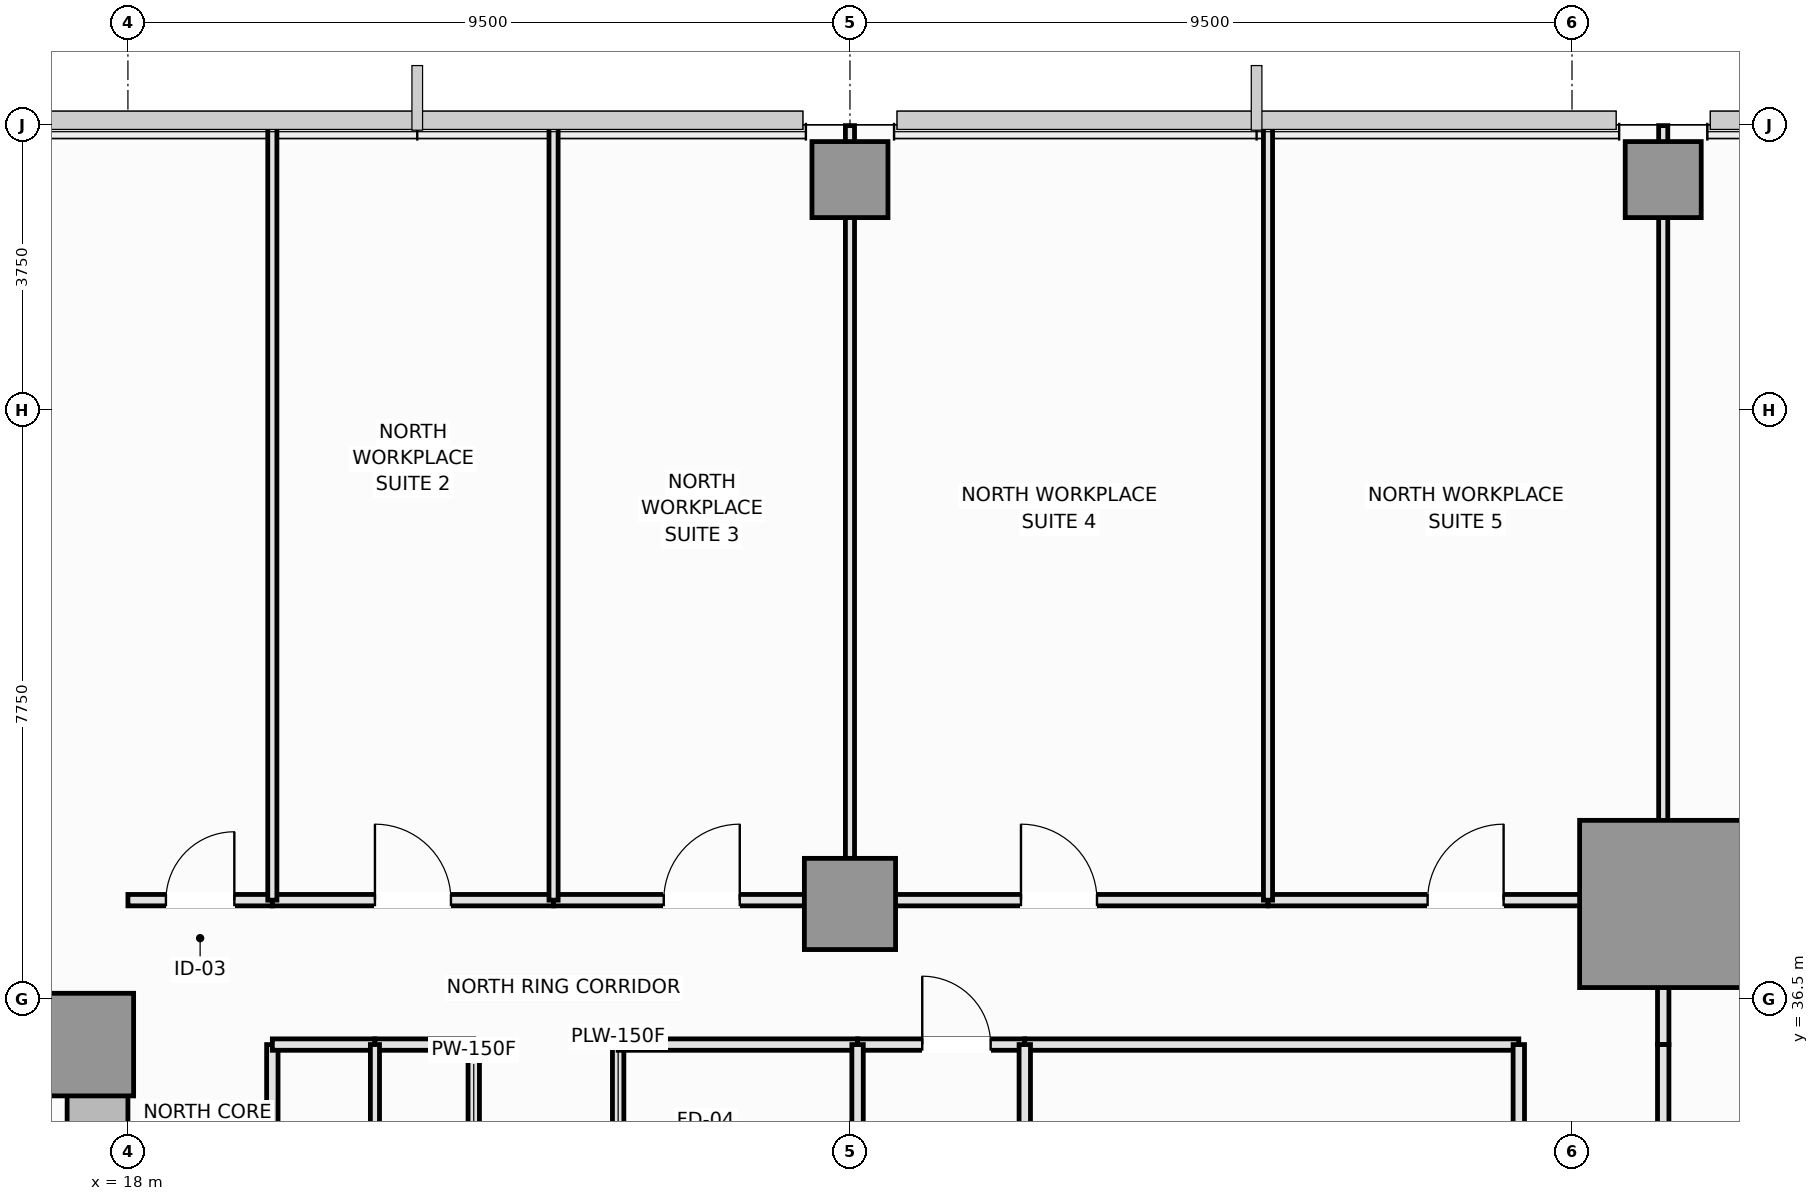
"""IFC4 building model, lengths in metres.
Left out: names, types, materials, properties, quantities, classifications, styles, units other than length and angle.
Written with IfcOpenShell. Run it as: python <this file> out.ifc"""

import sys

from ifc_helpers import new_model, si_unit, direction, frame, frame_2d, origin, origin_2d, place, context, subcontext, project, spatial, rectangle, extrude, element, fill, save


model = new_model("IFC4")
c1 = context("Model", 3, precision=1e-05, world=origin(), true_north=direction((0.0, 1.0)))
c2 = subcontext(c1, "Body", "Model", "MODEL_VIEW")
j1 = project(units=[si_unit("LENGTHUNIT", "METRE"), si_unit("PLANEANGLEUNIT", "RADIAN")], contexts=[c1])
p1 = place(None, origin())
s1 = spatial("IfcSite", under=j1, at=p1, CompositionType="ELEMENT")
p2 = place(p1, origin())
s2 = spatial("IfcBuilding", under=s1, at=p2, CompositionType="ELEMENT")
p3 = place(p2, frame((0.0, 0.0, 57.55)))
s3 = spatial("IfcBuildingStorey", under=s2, at=p3, CompositionType="ELEMENT", Elevation=57.55)
p4 = place(p3, frame((4.5, 36.1, 0.0), z_axis=(0.0, 0.0, 1.0), x_axis=(1.0, 0.0, 0.0)))
e1 = element("IfcWall", 1, at=p4, inside=s3, PredefinedType="SHEAR", context=c2, shape_type="SweptSolid", body=[
    extrude(rectangle(XDim=13.5, YDim=0.8, at=frame_2d((6.75, 0.0))), origin(), (0.0, 0.0, 1.0), 3.55),
])
p5 = place(p3, frame((17.6, 27.05, 0.0), z_axis=(0.0, 0.0, 1.0), x_axis=(0.0, 1.0, 0.0)))
e2 = element("IfcWall", 2, at=p5, inside=s3, PredefinedType="SHEAR", context=c2, shape_type="SweptSolid", body=[
    extrude(rectangle(XDim=8.65, YDim=0.8, at=frame_2d((4.325, 0.0))), origin(), (0.0, 0.0, 1.0), 3.55),
])
p6 = place(p5, frame((3.45, 0.0, 0.0)))
e3 = element("IfcOpeningElement", 3, at=p6, cuts=e2, PredefinedType="OPENING", context=c2, shape_type="SweptSolid", body=[
    extrude(rectangle(XDim=1.1, YDim=2.15, at=frame_2d((0.55, 1.075))), frame((0.0, 0.41, 0.0), z_axis=(0.0, -1.0, 0.0), x_axis=(1.0, 0.0, 0.0)), (0.0, 0.0, 1.0), 0.82),
])
p7 = place(p3, frame((17.4, 35.9, 0.0), z_axis=(0.0, 0.0, 1.0), x_axis=(1.0, 0.0, 0.0)))
e4 = element("IfcColumn", 4, at=p7, inside=s3, PredefinedType="PILASTER", context=c2, shape_type="SweptSolid", body=[
    extrude(rectangle(XDim=1.35, YDim=1.35, at=origin_2d()), origin(), (0.0, 0.0, 1.0), 3.55),
])
p8 = place(p3, frame((38.2, 37.75, 0.0), z_axis=(0.0, 0.0, 1.0), x_axis=(1.0, 0.0, 0.0)))
e5 = element("IfcColumn", 5, at=p8, inside=s3, PredefinedType="COLUMN", context=c2, shape_type="SweptSolid", body=[
    extrude(rectangle(XDim=2.2, YDim=2.2, at=origin_2d()), origin(), (0.0, 0.0, 1.0), 3.55),
])
p9 = place(p3, frame((27.5, 37.75, 0.0), z_axis=(0.0, 0.0, 1.0), x_axis=(1.0, 0.0, 0.0)))
e6 = element("IfcColumn", 6, at=p9, inside=s3, PredefinedType="COLUMN", context=c2, shape_type="SweptSolid", body=[
    extrude(rectangle(XDim=1.2, YDim=1.2, at=origin_2d()), origin(), (0.0, 0.0, 1.0), 3.55),
])
for number, where, z_axis, x_axis in (
    (7, (27.5, 47.28, 0.0), (0.0, 0.0, 1.0), (1.0, 0.0, 0.0)),
    (8, (38.2, 47.28, 0.0), (0.0, 0.0, 1.0), (1.0, 0.0, 0.0)),
):
    element("IfcColumn", number, at=place(p3, frame(where, z_axis=z_axis, x_axis=x_axis)), inside=s3, PredefinedType="COLUMN", context=c2, shape_type="SweptSolid", body=[
        extrude(rectangle(XDim=1.0, YDim=1.0, at=origin_2d()), origin(), (0.0, 0.0, 1.0), 3.55),
    ])
p10 = place(p3, frame((22.55, 29.75, 0.0), z_axis=(0.0, 0.0, 1.0), x_axis=(0.0, 1.0, 0.0)))
e9 = element("IfcWall", 9, at=p10, inside=s3, PredefinedType="PARTITIONING", context=c2, shape_type="SweptSolid", body=[
    extrude(rectangle(XDim=6.15, YDim=0.15, at=frame_2d((3.075, 0.0))), origin(), (0.0, 0.0, 1.0), 3.01),
])
p11 = place(p10, frame((2.575, 0.0, 0.0)))
e10 = element("IfcOpeningElement", 10, at=p11, cuts=e9, PredefinedType="OPENING", context=c2, shape_type="SweptSolid", body=[
    extrude(rectangle(XDim=1.0, YDim=2.15, at=frame_2d((0.5, 1.075))), frame((0.0, 0.085, 0.0), z_axis=(0.0, -1.0, 0.0), x_axis=(1.0, 0.0, 0.0)), (0.0, 0.0, 1.0), 0.17),
])
p12 = place(p3, frame((24.45, 32.8, 0.0), z_axis=(0.0, 0.0, 1.0), x_axis=(0.0, 1.0, 0.0)))
e11 = element("IfcWall", 11, at=p12, inside=s3, PredefinedType="PLUMBINGWALL", context=c2, shape_type="SweptSolid", body=[
    extrude(rectangle(XDim=3.1, YDim=0.15, at=frame_2d((1.55, 0.0))), origin(), (0.0, 0.0, 1.0), 3.37),
])
p13 = place(p12, frame((1.1, 0.0, 0.0)))
e12 = element("IfcOpeningElement", 12, at=p13, cuts=e11, PredefinedType="OPENING", context=c2, shape_type="SweptSolid", body=[
    extrude(rectangle(XDim=0.9, YDim=2.1, at=frame_2d((0.45, 1.05))), frame((0.0, 0.085, 0.0), z_axis=(0.0, -1.0, 0.0), x_axis=(1.0, 0.0, 0.0)), (0.0, 0.0, 1.0), 0.17),
])
p14 = place(p3, frame((19.9, 29.75, 0.0), z_axis=(0.0, 0.0, 1.0), x_axis=(0.0, 1.0, 0.0)))
e13 = element("IfcWall", 13, at=p14, inside=s3, PredefinedType="PARTITIONING", context=c2, shape_type="SweptSolid", body=[
    extrude(rectangle(XDim=6.15, YDim=0.15, at=frame_2d((3.075, 0.0))), origin(), (0.0, 0.0, 1.0), 3.37),
])
p15 = place(p14, frame((2.575, 0.0, 0.0)))
e14 = element("IfcOpeningElement", 14, at=p15, cuts=e13, PredefinedType="OPENING", context=c2, shape_type="SweptSolid", body=[
    extrude(rectangle(XDim=1.0, YDim=2.15, at=frame_2d((0.5, 1.075))), frame((0.0, 0.085, 0.0), z_axis=(0.0, -1.0, 0.0), x_axis=(1.0, 0.0, 0.0)), (0.0, 0.0, 1.0), 0.17),
])
p16 = place(p3, frame((19.9, 35.9, 0.0), z_axis=(0.0, 0.0, 1.0), x_axis=(1.0, 0.0, 0.0)))
e15 = element("IfcWall", 15, at=p16, inside=s3, PredefinedType="PARTITIONING", context=c2, shape_type="SweptSolid", body=[
    extrude(rectangle(XDim=1.35, YDim=0.15, at=frame_2d((0.675, 0.0))), origin(), (0.0, 0.0, 1.0), 3.37),
])
p17 = place(p3, frame((21.25, 35.9, 0.0), z_axis=(0.0, 0.0, 1.0), x_axis=(1.0, 0.0, 0.0)))
e16 = element("IfcWall", 16, at=p17, inside=s3, PredefinedType="PARTITIONING", context=c2, shape_type="SweptSolid", body=[
    extrude(rectangle(XDim=1.3, YDim=0.15, at=frame_2d((0.65, 0.0))), origin(), (0.0, 0.0, 1.0), 3.37),
])
p18 = place(p3, frame((24.45, 35.9, 0.0), z_axis=(0.0, 0.0, 1.0), x_axis=(1.0, 0.0, 0.0)))
e17 = element("IfcWall", 17, at=p18, inside=s3, PredefinedType="PLUMBINGWALL", context=c2, shape_type="SweptSolid", body=[
    extrude(rectangle(XDim=3.15, YDim=0.15, at=frame_2d((1.575, 0.0))), origin(), (0.0, 0.0, 1.0), 3.37),
])
p19 = place(p3, frame((27.6, 35.9, 0.0), z_axis=(0.0, 0.0, 1.0), x_axis=(1.0, 0.0, 0.0)))
e18 = element("IfcWall", 18, at=p19, inside=s3, PredefinedType="PLUMBINGWALL", context=c2, shape_type="SweptSolid", body=[
    extrude(rectangle(XDim=2.2, YDim=0.15, at=frame_2d((1.1, 0.0))), origin(), (0.0, 0.0, 1.0), 3.37),
])
p20 = place(p19, frame((0.851, 0.0, 0.0)))
e19 = element("IfcOpeningElement", 19, at=p20, cuts=e18, PredefinedType="OPENING", context=c2, shape_type="SweptSolid", body=[
    extrude(rectangle(XDim=0.9, YDim=2.1, at=frame_2d((0.45, 1.05))), frame((0.0, 0.085, 0.0), z_axis=(0.0, -1.0, 0.0), x_axis=(1.0, 0.0, 0.0)), (0.0, 0.0, 1.0), 0.17),
])
p21 = place(p3, frame((29.8, 35.9, 0.0), z_axis=(0.0, 0.0, 1.0), x_axis=(1.0, 0.0, 0.0)))
e20 = element("IfcWall", 20, at=p21, inside=s3, PredefinedType="PARTITIONING", context=c2, shape_type="SweptSolid", body=[
    extrude(rectangle(XDim=6.5, YDim=0.15, at=frame_2d((3.25, 0.0))), origin(), (0.0, 0.0, 1.0), 3.37),
])
p22 = place(p3, frame((18.0, 37.8, 0.0), z_axis=(0.0, 0.0, 1.0), x_axis=(1.0, 0.0, 0.0)))
e21 = element("IfcWall", 21, at=p22, inside=s3, PredefinedType="PARTITIONING", context=c2, shape_type="SweptSolid", body=[
    extrude(rectangle(XDim=1.9, YDim=0.15, at=frame_2d((0.95, 0.0))), origin(), (0.0, 0.0, 1.0), 2.72),
])
p23 = place(p22, frame((0.5, 0.0, 0.0)))
e22 = element("IfcOpeningElement", 22, at=p23, cuts=e21, PredefinedType="OPENING", context=c2, shape_type="SweptSolid", body=[
    extrude(rectangle(XDim=0.9, YDim=2.1, at=frame_2d((0.45, 1.05))), frame((0.0, 0.085, 0.0), z_axis=(0.0, -1.0, 0.0), x_axis=(1.0, 0.0, 0.0)), (0.0, 0.0, 1.0), 0.17),
])
p24 = place(p3, frame((19.9, 37.8, 0.0), z_axis=(0.0, 0.0, 1.0), x_axis=(1.0, 0.0, 0.0)))
e23 = element("IfcWall", 23, at=p24, inside=s3, PredefinedType="PARTITIONING", context=c2, shape_type="SweptSolid", body=[
    extrude(rectangle(XDim=3.7, YDim=0.15, at=frame_2d((1.85, 0.0))), origin(), (0.0, 0.0, 1.0), 2.72),
])
p25 = place(p24, frame((1.35, 0.0, 0.0)))
e24 = element("IfcOpeningElement", 24, at=p25, cuts=e23, PredefinedType="OPENING", context=c2, shape_type="SweptSolid", body=[
    extrude(rectangle(XDim=1.0, YDim=2.15, at=frame_2d((0.5, 1.075))), frame((0.0, 0.085, 0.0), z_axis=(0.0, -1.0, 0.0), x_axis=(1.0, 0.0, 0.0)), (0.0, 0.0, 1.0), 0.17),
])
p26 = place(p3, frame((23.6, 37.8, 0.0), z_axis=(0.0, 0.0, 1.0), x_axis=(1.0, 0.0, 0.0)))
e25 = element("IfcWall", 25, at=p26, inside=s3, PredefinedType="PARTITIONING", context=c2, shape_type="SweptSolid", body=[
    extrude(rectangle(XDim=3.9, YDim=0.15, at=frame_2d((1.95, 0.0))), origin(), (0.0, 0.0, 1.0), 2.72),
])
p27 = place(p26, frame((1.45, 0.0, 0.0)))
e26 = element("IfcOpeningElement", 26, at=p27, cuts=e25, PredefinedType="OPENING", context=c2, shape_type="SweptSolid", body=[
    extrude(rectangle(XDim=1.0, YDim=2.15, at=frame_2d((0.5, 1.075))), frame((0.0, 0.085, 0.0), z_axis=(0.0, -1.0, 0.0), x_axis=(1.0, 0.0, 0.0)), (0.0, 0.0, 1.0), 0.17),
])
p28 = place(p3, frame((27.5, 37.8, 0.0), z_axis=(0.0, 0.0, 1.0), x_axis=(1.0, 0.0, 0.0)))
e27 = element("IfcWall", 27, at=p28, inside=s3, PredefinedType="PARTITIONING", context=c2, shape_type="SweptSolid", body=[
    extrude(rectangle(XDim=5.5, YDim=0.15, at=frame_2d((2.75, 0.0))), origin(), (0.0, 0.0, 1.0), 2.72),
])
p29 = place(p28, frame((2.25, 0.0, 0.0)))
e28 = element("IfcOpeningElement", 28, at=p29, cuts=e27, PredefinedType="OPENING", context=c2, shape_type="SweptSolid", body=[
    extrude(rectangle(XDim=1.0, YDim=2.15, at=frame_2d((0.5, 1.075))), frame((0.0, 0.085, 0.0), z_axis=(0.0, -1.0, 0.0), x_axis=(1.0, 0.0, 0.0)), (0.0, 0.0, 1.0), 0.17),
])
p30 = place(p3, frame((33.0, 37.8, 0.0), z_axis=(0.0, 0.0, 1.0), x_axis=(1.0, 0.0, 0.0)))
e29 = element("IfcWall", 29, at=p30, inside=s3, PredefinedType="PARTITIONING", context=c2, shape_type="SweptSolid", body=[
    extrude(rectangle(XDim=5.2, YDim=0.15, at=frame_2d((2.6, 0.0))), origin(), (0.0, 0.0, 1.0), 2.72),
])
p31 = place(p30, frame((2.1, 0.0, 0.0)))
e30 = element("IfcOpeningElement", 30, at=p31, cuts=e29, PredefinedType="OPENING", context=c2, shape_type="SweptSolid", body=[
    extrude(rectangle(XDim=1.0, YDim=2.15, at=frame_2d((0.5, 1.075))), frame((0.0, 0.085, 0.0), z_axis=(0.0, -1.0, 0.0), x_axis=(1.0, 0.0, 0.0)), (0.0, 0.0, 1.0), 0.17),
])
p32 = place(p3, frame((38.2, 35.9, 0.0), z_axis=(0.0, 0.0, 1.0), x_axis=(0.0, 1.0, 0.0)))
e31 = element("IfcWall", 31, at=p32, inside=s3, PredefinedType="PARTITIONING", context=c2, shape_type="SweptSolid", body=[
    extrude(rectangle(XDim=1.9, YDim=0.15, at=frame_2d((0.95, 0.0))), origin(), (0.0, 0.0, 1.0), 2.82),
])
p33 = place(p3, frame((36.3, 32.8, 0.0), z_axis=(0.0, 0.0, 1.0), x_axis=(0.0, 1.0, 0.0)))
e32 = element("IfcWall", 32, at=p33, inside=s3, PredefinedType="PARTITIONING", context=c2, shape_type="SweptSolid", body=[
    extrude(rectangle(XDim=3.1, YDim=0.15, at=frame_2d((1.55, 0.0))), origin(), (0.0, 0.0, 1.0), 3.37),
])
p34 = place(p33, frame((1.05, 0.0, 0.0)))
e33 = element("IfcOpeningElement", 33, at=p34, cuts=e32, PredefinedType="OPENING", context=c2, shape_type="SweptSolid", body=[
    extrude(rectangle(XDim=1.0, YDim=2.15, at=frame_2d((0.5, 1.075))), frame((0.0, 0.085, 0.0), z_axis=(0.0, -1.0, 0.0), x_axis=(1.0, 0.0, 0.0)), (0.0, 0.0, 1.0), 0.17),
])
p35 = place(p3, frame((38.2, 28.65, 0.0), z_axis=(0.0, 0.0, 1.0), x_axis=(0.0, 1.0, 0.0)))
e34 = element("IfcWall", 34, at=p35, inside=s3, PredefinedType="PARTITIONING", context=c2, shape_type="SweptSolid", body=[
    extrude(rectangle(XDim=7.25, YDim=0.15, at=frame_2d((3.625, 0.0))), origin(), (0.0, 0.0, 1.0), 2.82),
])
p36 = place(p35, frame((4.303, 0.0, 0.0)))
e35 = element("IfcOpeningElement", 35, at=p36, cuts=e34, PredefinedType="OPENING", context=c2, shape_type="SweptSolid", body=[
    extrude(rectangle(XDim=1.0, YDim=2.15, at=frame_2d((0.5, 1.075))), frame((0.0, 0.085, 0.0), z_axis=(0.0, -1.0, 0.0), x_axis=(1.0, 0.0, 0.0)), (0.0, 0.0, 1.0), 0.17),
])
p37 = place(p3, frame((21.25, 29.75, 0.0), z_axis=(0.0, 0.0, 1.0), x_axis=(0.0, 1.0, 0.0)))
e36 = element("IfcWall", 36, at=p37, inside=s3, PredefinedType="PARTITIONING", context=c2, shape_type="SweptSolid", body=[
    extrude(rectangle(XDim=6.15, YDim=0.12, at=frame_2d((3.075, 0.0))), origin(), (0.0, 0.0, 1.0), 3.37),
])
for number, where, z_axis, x_axis in (
    (37, (27.6, 32.8, 0.0), (0.0, 0.0, 1.0), (0.0, 1.0, 0.0)),
    (38, (29.8, 32.8, 0.0), (0.0, 0.0, 1.0), (0.0, 1.0, 0.0)),
):
    element("IfcWall", number, at=place(p3, frame(where, z_axis=z_axis, x_axis=x_axis)), inside=s3, PredefinedType="PLUMBINGWALL", context=c2, shape_type="SweptSolid", body=[
        extrude(rectangle(XDim=3.1, YDim=0.15, at=frame_2d((1.55, 0.0))), origin(), (0.0, 0.0, 1.0), 3.37),
    ])
for number, where, z_axis, x_axis in (
    (39, (19.9, 37.8, 0.0), (0.0, 0.0, 1.0), (0.0, 1.0, 0.0)),
    (40, (23.6, 37.8, 0.0), (0.0, 0.0, 1.0), (0.0, 1.0, 0.0)),
):
    element("IfcWall", number, at=place(p3, frame(where, z_axis=z_axis, x_axis=x_axis)), inside=s3, PredefinedType="PARTITIONING", context=c2, shape_type="SweptSolid", body=[
        extrude(rectangle(XDim=10.19, YDim=0.12, at=frame_2d((5.095, 0.0))), origin(), (0.0, 0.0, 1.0), 3.37),
    ])
p38 = place(p3, frame((27.5, 37.8, 0.0), z_axis=(0.0, 0.0, 1.0), x_axis=(0.0, 1.0, 0.0)))
e41 = element("IfcWall", 41, at=p38, inside=s3, PredefinedType="PARTITIONING", context=c2, shape_type="SweptSolid", body=[
    extrude(rectangle(XDim=10.19, YDim=0.12, at=frame_2d((5.095, 0.0))), origin(), (0.0, 0.0, 1.0), 2.82),
])
p39 = place(p3, frame((33.0, 37.8, 0.0), z_axis=(0.0, 0.0, 1.0), x_axis=(0.0, 1.0, 0.0)))
e42 = element("IfcWall", 42, at=p39, inside=s3, PredefinedType="PARTITIONING", context=c2, shape_type="SweptSolid", body=[
    extrude(rectangle(XDim=10.19, YDim=0.12, at=frame_2d((5.095, 0.0))), origin(), (0.0, 0.0, 1.0), 3.37),
])
p40 = place(p3, frame((38.2, 37.8, 0.0), z_axis=(0.0, 0.0, 1.0), x_axis=(0.0, 1.0, 0.0)))
e43 = element("IfcWall", 43, at=p40, inside=s3, PredefinedType="PARTITIONING", context=c2, shape_type="SweptSolid", body=[
    extrude(rectangle(XDim=10.19, YDim=0.12, at=frame_2d((5.095, 0.0))), origin(), (0.0, 0.0, 1.0), 2.82),
])
p41 = place(p20, origin())
e44 = element("IfcDoor", 44, at=p41, inside=s3, OperationType="SINGLE_SWING_LEFT", PredefinedType="DOOR", context=c2, shape_type="SweptSolid", body=[
    extrude(rectangle(XDim=0.9, YDim=2.1, at=frame_2d((0.45, 1.05))), frame((0.0, 0.025, 0.0), z_axis=(0.0, -1.0, 0.0), x_axis=(1.0, 0.0, 0.0)), (0.0, 0.0, 1.0), 0.05),
])
fill(e19, e44)
p42 = place(p23, origin())
e45 = element("IfcDoor", 45, at=p42, inside=s3, OperationType="SINGLE_SWING_RIGHT", PredefinedType="DOOR", context=c2, shape_type="SweptSolid", body=[
    extrude(rectangle(XDim=0.9, YDim=2.1, at=frame_2d((0.45, 1.05))), frame((0.0, 0.025, 0.0), z_axis=(0.0, -1.0, 0.0), x_axis=(1.0, 0.0, 0.0)), (0.0, 0.0, 1.0), 0.05),
])
fill(e22, e45)
p43 = place(p25, origin())
e46 = element("IfcDoor", 46, at=p43, inside=s3, OperationType="SINGLE_SWING_LEFT", PredefinedType="DOOR", context=c2, shape_type="SweptSolid", body=[
    extrude(rectangle(XDim=1.0, YDim=2.15, at=frame_2d((0.5, 1.075))), frame((0.0, 0.025, 0.0), z_axis=(0.0, -1.0, 0.0), x_axis=(1.0, 0.0, 0.0)), (0.0, 0.0, 1.0), 0.05),
])
fill(e24, e46)
p44 = place(p27, origin())
e47 = element("IfcDoor", 47, at=p44, inside=s3, OperationType="SINGLE_SWING_RIGHT", PredefinedType="DOOR", context=c2, shape_type="SweptSolid", body=[
    extrude(rectangle(XDim=1.0, YDim=2.15, at=frame_2d((0.5, 1.075))), frame((0.0, 0.025, 0.0), z_axis=(0.0, -1.0, 0.0), x_axis=(1.0, 0.0, 0.0)), (0.0, 0.0, 1.0), 0.05),
])
fill(e26, e47)
p45 = place(p29, origin())
e48 = element("IfcDoor", 48, at=p45, inside=s3, OperationType="SINGLE_SWING_LEFT", PredefinedType="DOOR", context=c2, shape_type="SweptSolid", body=[
    extrude(rectangle(XDim=1.0, YDim=2.15, at=frame_2d((0.5, 1.075))), frame((0.0, 0.025, 0.0), z_axis=(0.0, -1.0, 0.0), x_axis=(1.0, 0.0, 0.0)), (0.0, 0.0, 1.0), 0.05),
])
fill(e28, e48)
p46 = place(p31, origin())
e49 = element("IfcDoor", 49, at=p46, inside=s3, OperationType="SINGLE_SWING_RIGHT", PredefinedType="DOOR", context=c2, shape_type="SweptSolid", body=[
    extrude(rectangle(XDim=1.0, YDim=2.15, at=frame_2d((0.5, 1.075))), frame((0.0, 0.025, 0.0), z_axis=(0.0, -1.0, 0.0), x_axis=(1.0, 0.0, 0.0)), (0.0, 0.0, 1.0), 0.05),
])
fill(e30, e49)
save(model, sys.argv[1])
